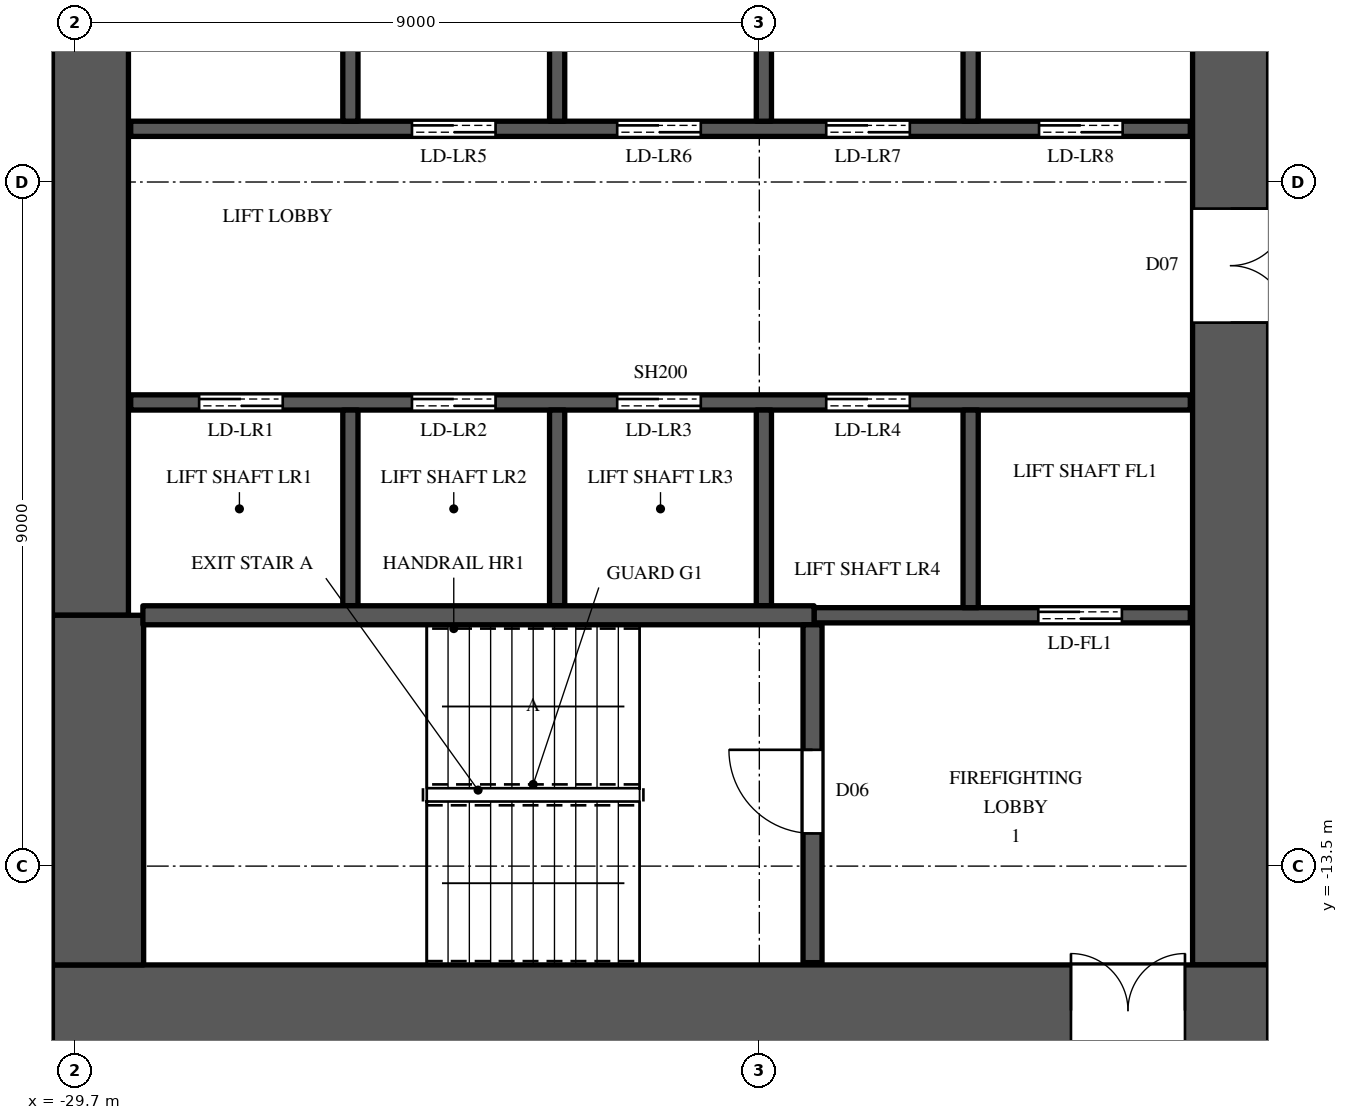
"""IFC4 building model, lengths in metres.
Left out: names, types, materials, properties, quantities, classifications, styles, units other than length and angle.
Written with IfcOpenShell. Run it as: python <this file> out.ifc"""

import sys

from ifc_helpers import new_model, si_unit, direction, frame, frame_2d, origin, place, context, subcontext, project, spatial, rectangle, extrude, element, fill, save


model = new_model("IFC4")
c1 = context("Model", 3, precision=1e-05, world=origin(), true_north=direction((0.0, 1.0)))
c2 = subcontext(c1, "Body", "Model", "MODEL_VIEW")
j1 = project(units=[si_unit("LENGTHUNIT", "METRE"), si_unit("PLANEANGLEUNIT", "RADIAN")], contexts=[c1])
p1 = place(None, origin())
s1 = spatial("IfcSite", under=j1, at=p1, CompositionType="ELEMENT")
p2 = place(p1, origin())
s2 = spatial("IfcBuilding", under=s1, at=p2, CompositionType="ELEMENT")
p3 = place(p2, frame((0.0, 0.0, 102.3)))
s3 = spatial("IfcBuildingStorey", under=s2, at=p3, CompositionType="ELEMENT", Elevation=102.3)
p4 = place(p3, frame((-30.0, -15.4, 0.0), z_axis=(0.0, 0.0, 1.0), x_axis=(1.0, 0.0, 0.0)))
e1 = element("IfcWall", 1, at=p4, inside=s3, PredefinedType="SHEAR", context=c2, shape_type="SweptSolid", body=[
    extrude(rectangle(XDim=16.0, YDim=1.2, at=frame_2d((8.0, 0.0))), origin(), (0.0, 0.0, 1.0), 3.6),
])
p5 = place(p4, frame((13.4, 0.0, 0.0)))
e2 = element("IfcOpeningElement", 2, at=p5, cuts=e1, PredefinedType="OPENING", context=c2, shape_type="SweptSolid", body=[
    extrude(rectangle(XDim=1.5, YDim=2.4, at=frame_2d((0.75, 1.2))), frame((0.0, 0.61, 0.0), z_axis=(0.0, -1.0, 0.0), x_axis=(1.0, 0.0, 0.0)), (0.0, 0.0, 1.0), 1.22),
])
p6 = place(p3, frame((-14.5, -14.8, 0.0), z_axis=(0.0, 0.0, 1.0), x_axis=(0.0, 1.0, 0.0)))
e3 = element("IfcWall", 3, at=p6, inside=s3, PredefinedType="SHEAR", context=c2, shape_type="SweptSolid", body=[
    extrude(rectangle(XDim=29.6, YDim=1.0, at=frame_2d((14.8, 0.0))), origin(), (0.0, 0.0, 1.0), 3.6),
])
p7 = place(p6, frame((8.45, 0.0, 0.0)))
e4 = element("IfcOpeningElement", 4, at=p7, cuts=e3, PredefinedType="OPENING", context=c2, shape_type="SweptSolid", body=[
    extrude(rectangle(XDim=1.5, YDim=2.4, at=frame_2d((0.75, 1.2))), frame((0.0, 0.51, 0.0), z_axis=(0.0, -1.0, 0.0), x_axis=(1.0, 0.0, 0.0)), (0.0, 0.0, 1.0), 1.02),
])
p8 = place(p6, frame((19.65, 0.0, 0.0)))
e5 = element("IfcOpeningElement", 5, at=p8, cuts=e3, PredefinedType="OPENING", context=c2, shape_type="SweptSolid", body=[
    extrude(rectangle(XDim=1.5, YDim=2.4, at=frame_2d((0.75, 1.2))), frame((0.0, 0.51, 0.0), z_axis=(0.0, -1.0, 0.0), x_axis=(1.0, 0.0, 0.0)), (0.0, 0.0, 1.0), 1.02),
])
p9 = place(p6, frame((14.5, 0.0, 0.0)))
e6 = element("IfcOpeningElement", 6, at=p9, cuts=e3, PredefinedType="OPENING", context=c2, shape_type="SweptSolid", body=[
    extrude(rectangle(XDim=0.6, YDim=2.0, at=frame_2d((0.3, 1.0))), frame((0.0, 0.51, 0.0), z_axis=(0.0, -1.0, 0.0), x_axis=(1.0, 0.0, 0.0)), (0.0, 0.0, 1.0), 1.02),
])
p10 = place(p3, frame((-29.5, -10.2, 0.0), z_axis=(0.0, 0.0, 1.0), x_axis=(0.0, 1.0, 0.0)))
e7 = element("IfcWall", 7, at=p10, inside=s3, PredefinedType="SHEAR", context=c2, shape_type="SweptSolid", body=[
    extrude(rectangle(XDim=20.4, YDim=1.0, at=frame_2d((10.2, 0.0))), origin(), (0.0, 0.0, 1.0), 3.6),
])
p11 = place(p3, frame((-29.4, -14.8, 0.0), z_axis=(0.0, 0.0, 1.0), x_axis=(0.0, 1.0, 0.0)))
e8 = element("IfcWall", 8, at=p11, inside=s3, PredefinedType="SHEAR", context=c2, shape_type="SweptSolid", body=[
    extrude(rectangle(XDim=4.6, YDim=1.2, at=frame_2d((2.3, 0.0))), origin(), (0.0, 0.0, 1.0), 3.6),
])
p12 = place(p3, frame((-28.97, -7.4, 0.0), z_axis=(0.0, 0.0, 1.0), x_axis=(1.0, 0.0, 0.0)))
e9 = element("IfcWall", 9, at=p12, inside=s3, PredefinedType="SHEAR", context=c2, shape_type="SweptSolid", body=[
    extrude(rectangle(XDim=13.94, YDim=0.2, at=frame_2d((6.97, 0.0))), origin(), (0.0, 0.0, 1.0), 3.3),
])
p13 = place(p12, frame((0.9, 0.0, 0.0)))
e10 = element("IfcOpeningElement", 10, at=p13, cuts=e9, PredefinedType="OPENING", context=c2, shape_type="SweptSolid", body=[
    extrude(rectangle(XDim=1.1, YDim=2.2, at=frame_2d((0.55, 1.1))), frame((0.0, 0.11, 0.0), z_axis=(0.0, -1.0, 0.0), x_axis=(1.0, 0.0, 0.0)), (0.0, 0.0, 1.0), 0.22),
])
p14 = place(p12, frame((3.7, 0.0, 0.0)))
e11 = element("IfcOpeningElement", 11, at=p14, cuts=e9, PredefinedType="OPENING", context=c2, shape_type="SweptSolid", body=[
    extrude(rectangle(XDim=1.1, YDim=2.2, at=frame_2d((0.55, 1.1))), frame((0.0, 0.11, 0.0), z_axis=(0.0, -1.0, 0.0), x_axis=(1.0, 0.0, 0.0)), (0.0, 0.0, 1.0), 0.22),
])
p15 = place(p12, frame((6.4, 0.0, 0.0)))
e12 = element("IfcOpeningElement", 12, at=p15, cuts=e9, PredefinedType="OPENING", context=c2, shape_type="SweptSolid", body=[
    extrude(rectangle(XDim=1.1, YDim=2.2, at=frame_2d((0.55, 1.1))), frame((0.0, 0.11, 0.0), z_axis=(0.0, -1.0, 0.0), x_axis=(1.0, 0.0, 0.0)), (0.0, 0.0, 1.0), 0.22),
])
p16 = place(p12, frame((9.15, 0.0, 0.0)))
e13 = element("IfcOpeningElement", 13, at=p16, cuts=e9, PredefinedType="OPENING", context=c2, shape_type="SweptSolid", body=[
    extrude(rectangle(XDim=1.1, YDim=2.2, at=frame_2d((0.55, 1.1))), frame((0.0, 0.11, 0.0), z_axis=(0.0, -1.0, 0.0), x_axis=(1.0, 0.0, 0.0)), (0.0, 0.0, 1.0), 0.22),
])
p17 = place(p3, frame((-28.97, -3.8, 0.0), z_axis=(0.0, 0.0, 1.0), x_axis=(1.0, 0.0, 0.0)))
e14 = element("IfcWall", 14, at=p17, inside=s3, PredefinedType="SHEAR", context=c2, shape_type="SweptSolid", body=[
    extrude(rectangle(XDim=13.94, YDim=0.2, at=frame_2d((6.97, 0.0))), origin(), (0.0, 0.0, 1.0), 3.3),
])
p18 = place(p17, frame((3.7, 0.0, 0.0)))
e15 = element("IfcOpeningElement", 15, at=p18, cuts=e14, PredefinedType="OPENING", context=c2, shape_type="SweptSolid", body=[
    extrude(rectangle(XDim=1.1, YDim=2.2, at=frame_2d((0.55, 1.1))), frame((0.0, 0.11, 0.0), z_axis=(0.0, -1.0, 0.0), x_axis=(1.0, 0.0, 0.0)), (0.0, 0.0, 1.0), 0.22),
])
p19 = place(p17, frame((6.4, 0.0, 0.0)))
e16 = element("IfcOpeningElement", 16, at=p19, cuts=e14, PredefinedType="OPENING", context=c2, shape_type="SweptSolid", body=[
    extrude(rectangle(XDim=1.1, YDim=2.2, at=frame_2d((0.55, 1.1))), frame((0.0, 0.11, 0.0), z_axis=(0.0, -1.0, 0.0), x_axis=(1.0, 0.0, 0.0)), (0.0, 0.0, 1.0), 0.22),
])
p20 = place(p17, frame((9.15, 0.0, 0.0)))
e17 = element("IfcOpeningElement", 17, at=p20, cuts=e14, PredefinedType="OPENING", context=c2, shape_type="SweptSolid", body=[
    extrude(rectangle(XDim=1.1, YDim=2.2, at=frame_2d((0.55, 1.1))), frame((0.0, 0.11, 0.0), z_axis=(0.0, -1.0, 0.0), x_axis=(1.0, 0.0, 0.0)), (0.0, 0.0, 1.0), 0.22),
])
p21 = place(p17, frame((11.95, 0.0, 0.0)))
e18 = element("IfcOpeningElement", 18, at=p21, cuts=e14, PredefinedType="OPENING", context=c2, shape_type="SweptSolid", body=[
    extrude(rectangle(XDim=1.1, YDim=2.2, at=frame_2d((0.55, 1.1))), frame((0.0, 0.11, 0.0), z_axis=(0.0, -1.0, 0.0), x_axis=(1.0, 0.0, 0.0)), (0.0, 0.0, 1.0), 0.22),
])
p22 = place(p3, frame((-26.08, -10.075, 0.0), z_axis=(0.0, 0.0, 1.0), x_axis=(0.0, 1.0, 0.0)))
e19 = element("IfcWall", 19, at=p22, inside=s3, PredefinedType="SHEAR", context=c2, shape_type="SweptSolid", body=[
    extrude(rectangle(XDim=2.575, YDim=0.2, at=frame_2d((1.288, 0.0))), origin(), (0.0, 0.0, 1.0), 3.6),
])
p23 = place(p3, frame((-26.08, -3.7, 0.0), z_axis=(0.0, 0.0, 1.0), x_axis=(0.0, 1.0, 0.0)))
e20 = element("IfcWall", 20, at=p23, inside=s3, PredefinedType="SHEAR", context=c2, shape_type="SweptSolid", body=[
    extrude(rectangle(XDim=2.6, YDim=0.2, at=frame_2d((1.3, 0.0))), origin(), (0.0, 0.0, 1.0), 3.6),
])
p24 = place(p3, frame((-23.36, -10.075, 0.0), z_axis=(0.0, 0.0, 1.0), x_axis=(0.0, 1.0, 0.0)))
e21 = element("IfcWall", 21, at=p24, inside=s3, PredefinedType="SHEAR", context=c2, shape_type="SweptSolid", body=[
    extrude(rectangle(XDim=2.575, YDim=0.2, at=frame_2d((1.288, 0.0))), origin(), (0.0, 0.0, 1.0), 3.6),
])
p25 = place(p3, frame((-23.36, -3.7, 0.0), z_axis=(0.0, 0.0, 1.0), x_axis=(0.0, 1.0, 0.0)))
e22 = element("IfcWall", 22, at=p25, inside=s3, PredefinedType="SHEAR", context=c2, shape_type="SweptSolid", body=[
    extrude(rectangle(XDim=2.6, YDim=0.2, at=frame_2d((1.3, 0.0))), origin(), (0.0, 0.0, 1.0), 3.6),
])
p26 = place(p3, frame((-20.64, -10.075, 0.0), z_axis=(0.0, 0.0, 1.0), x_axis=(0.0, 1.0, 0.0)))
e23 = element("IfcWall", 23, at=p26, inside=s3, PredefinedType="SHEAR", context=c2, shape_type="SweptSolid", body=[
    extrude(rectangle(XDim=2.575, YDim=0.2, at=frame_2d((1.288, 0.0))), origin(), (0.0, 0.0, 1.0), 3.6),
])
p27 = place(p3, frame((-20.64, -3.7, 0.0), z_axis=(0.0, 0.0, 1.0), x_axis=(0.0, 1.0, 0.0)))
e24 = element("IfcWall", 24, at=p27, inside=s3, PredefinedType="SHEAR", context=c2, shape_type="SweptSolid", body=[
    extrude(rectangle(XDim=2.6, YDim=0.2, at=frame_2d((1.3, 0.0))), origin(), (0.0, 0.0, 1.0), 3.6),
])
p28 = place(p3, frame((-19.98, -10.2, 0.0), z_axis=(0.0, 0.0, 1.0), x_axis=(1.0, 0.0, 0.0)))
e25 = element("IfcWall", 25, at=p28, inside=s3, PredefinedType="SHEAR", context=c2, shape_type="SweptSolid", body=[
    extrude(rectangle(XDim=4.95, YDim=0.2, at=frame_2d((2.475, 0.0))), origin(), (0.0, 0.0, 1.0), 3.3),
])
p29 = place(p28, frame((2.95, 0.0, 0.0)))
e26 = element("IfcOpeningElement", 26, at=p29, cuts=e25, PredefinedType="OPENING", context=c2, shape_type="SweptSolid", body=[
    extrude(rectangle(XDim=1.1, YDim=2.2, at=frame_2d((0.55, 1.1))), frame((0.0, 0.11, 0.0), z_axis=(0.0, -1.0, 0.0), x_axis=(1.0, 0.0, 0.0)), (0.0, 0.0, 1.0), 0.22),
])
p30 = place(p3, frame((-17.92, -10.1, 0.0), z_axis=(0.0, 0.0, 1.0), x_axis=(0.0, 1.0, 0.0)))
e27 = element("IfcWall", 27, at=p30, inside=s3, PredefinedType="SHEAR", context=c2, shape_type="SweptSolid", body=[
    extrude(rectangle(XDim=2.6, YDim=0.2, at=frame_2d((1.3, 0.0))), origin(), (0.0, 0.0, 1.0), 3.6),
])
p31 = place(p3, frame((-17.92, -3.7, 0.0), z_axis=(0.0, 0.0, 1.0), x_axis=(0.0, 1.0, 0.0)))
e28 = element("IfcWall", 28, at=p31, inside=s3, PredefinedType="SHEAR", context=c2, shape_type="SweptSolid", body=[
    extrude(rectangle(XDim=2.6, YDim=0.2, at=frame_2d((1.3, 0.0))), origin(), (0.0, 0.0, 1.0), 3.6),
])
p32 = place(p3, frame((-28.81, -10.2, 0.0), z_axis=(0.0, 0.0, 1.0), x_axis=(1.0, 0.0, 0.0)))
e29 = element("IfcWall", 29, at=p32, inside=s3, PredefinedType="SHEAR", context=c2, shape_type="SweptSolid", body=[
    extrude(rectangle(XDim=8.83, YDim=0.25, at=frame_2d((4.415, 0.0))), origin(), (0.0, 0.0, 1.0), 3.3),
])
p33 = place(p3, frame((-20.0, -14.77, 0.0), z_axis=(0.0, 0.0, 1.0), x_axis=(0.0, 1.0, 0.0)))
e30 = element("IfcWall", 30, at=p33, inside=s3, PredefinedType="SHEAR", context=c2, shape_type="SweptSolid", body=[
    extrude(rectangle(XDim=4.445, YDim=0.25, at=frame_2d((2.223, 0.0))), origin(), (0.0, 0.0, 1.0), 3.3),
])
p34 = place(p33, frame((1.7, 0.0, 0.0)))
e31 = element("IfcOpeningElement", 31, at=p34, cuts=e30, PredefinedType="OPENING", context=c2, shape_type="SweptSolid", body=[
    extrude(rectangle(XDim=1.1, YDim=2.2, at=frame_2d((0.55, 1.1))), frame((0.0, 0.135, 0.0), z_axis=(0.0, -1.0, 0.0), x_axis=(1.0, 0.0, 0.0)), (0.0, 0.0, 1.0), 0.27),
])
p35 = place(p34, origin())
e32 = element("IfcDoor", 32, at=p35, inside=s3, OperationType="SINGLE_SWING_RIGHT", PredefinedType="DOOR", context=c2, shape_type="SweptSolid", body=[
    extrude(rectangle(XDim=1.1, YDim=2.2, at=frame_2d((0.55, 1.1))), frame((0.0, 0.025, 0.0), z_axis=(0.0, -1.0, 0.0), x_axis=(1.0, 0.0, 0.0)), (0.0, 0.0, 1.0), 0.05),
])
fill(e31, e32)
p36 = place(p13, origin())
e33 = element("IfcDoor", 33, at=p36, inside=s3, OperationType="DOUBLE_DOOR_SLIDING", PredefinedType="DOOR", context=c2, shape_type="SweptSolid", body=[
    extrude(rectangle(XDim=1.1, YDim=2.2, at=frame_2d((0.55, 1.1))), frame((0.0, 0.025, 0.0), z_axis=(0.0, -1.0, 0.0), x_axis=(1.0, 0.0, 0.0)), (0.0, 0.0, 1.0), 0.05),
])
fill(e10, e33)
p37 = place(p14, origin())
e34 = element("IfcDoor", 34, at=p37, inside=s3, OperationType="DOUBLE_DOOR_SLIDING", PredefinedType="DOOR", context=c2, shape_type="SweptSolid", body=[
    extrude(rectangle(XDim=1.1, YDim=2.2, at=frame_2d((0.55, 1.1))), frame((0.0, 0.025, 0.0), z_axis=(0.0, -1.0, 0.0), x_axis=(1.0, 0.0, 0.0)), (0.0, 0.0, 1.0), 0.05),
])
fill(e11, e34)
p38 = place(p15, origin())
e35 = element("IfcDoor", 35, at=p38, inside=s3, OperationType="DOUBLE_DOOR_SLIDING", PredefinedType="DOOR", context=c2, shape_type="SweptSolid", body=[
    extrude(rectangle(XDim=1.1, YDim=2.2, at=frame_2d((0.55, 1.1))), frame((0.0, 0.025, 0.0), z_axis=(0.0, -1.0, 0.0), x_axis=(1.0, 0.0, 0.0)), (0.0, 0.0, 1.0), 0.05),
])
fill(e12, e35)
p39 = place(p16, origin())
e36 = element("IfcDoor", 36, at=p39, inside=s3, OperationType="DOUBLE_DOOR_SLIDING", PredefinedType="DOOR", context=c2, shape_type="SweptSolid", body=[
    extrude(rectangle(XDim=1.1, YDim=2.2, at=frame_2d((0.55, 1.1))), frame((0.0, 0.025, 0.0), z_axis=(0.0, -1.0, 0.0), x_axis=(1.0, 0.0, 0.0)), (0.0, 0.0, 1.0), 0.05),
])
fill(e13, e36)
p40 = place(p29, origin())
e37 = element("IfcDoor", 37, at=p40, inside=s3, OperationType="DOUBLE_DOOR_SLIDING", PredefinedType="DOOR", context=c2, shape_type="SweptSolid", body=[
    extrude(rectangle(XDim=1.1, YDim=2.2, at=frame_2d((0.55, 1.1))), frame((0.0, 0.025, 0.0), z_axis=(0.0, -1.0, 0.0), x_axis=(1.0, 0.0, 0.0)), (0.0, 0.0, 1.0), 0.05),
])
fill(e26, e37)
p41 = place(p18, origin())
e38 = element("IfcDoor", 38, at=p41, inside=s3, OperationType="DOUBLE_DOOR_SLIDING", PredefinedType="DOOR", context=c2, shape_type="SweptSolid", body=[
    extrude(rectangle(XDim=1.1, YDim=2.2, at=frame_2d((0.55, 1.1))), frame((0.0, 0.025, 0.0), z_axis=(0.0, -1.0, 0.0), x_axis=(1.0, 0.0, 0.0)), (0.0, 0.0, 1.0), 0.05),
])
fill(e15, e38)
p42 = place(p19, origin())
e39 = element("IfcDoor", 39, at=p42, inside=s3, OperationType="DOUBLE_DOOR_SLIDING", PredefinedType="DOOR", context=c2, shape_type="SweptSolid", body=[
    extrude(rectangle(XDim=1.1, YDim=2.2, at=frame_2d((0.55, 1.1))), frame((0.0, 0.025, 0.0), z_axis=(0.0, -1.0, 0.0), x_axis=(1.0, 0.0, 0.0)), (0.0, 0.0, 1.0), 0.05),
])
fill(e16, e39)
p43 = place(p20, origin())
e40 = element("IfcDoor", 40, at=p43, inside=s3, OperationType="DOUBLE_DOOR_SLIDING", PredefinedType="DOOR", context=c2, shape_type="SweptSolid", body=[
    extrude(rectangle(XDim=1.1, YDim=2.2, at=frame_2d((0.55, 1.1))), frame((0.0, 0.025, 0.0), z_axis=(0.0, -1.0, 0.0), x_axis=(1.0, 0.0, 0.0)), (0.0, 0.0, 1.0), 0.05),
])
fill(e17, e40)
p44 = place(p21, origin())
e41 = element("IfcDoor", 41, at=p44, inside=s3, OperationType="DOUBLE_DOOR_SLIDING", PredefinedType="DOOR", context=c2, shape_type="SweptSolid", body=[
    extrude(rectangle(XDim=1.1, YDim=2.2, at=frame_2d((0.55, 1.1))), frame((0.0, 0.025, 0.0), z_axis=(0.0, -1.0, 0.0), x_axis=(1.0, 0.0, 0.0)), (0.0, 0.0, 1.0), 0.05),
])
fill(e18, e41)
p45 = place(p5, origin())
e42 = element("IfcDoor", 42, at=p45, inside=s3, OperationType="DOUBLE_DOOR_SINGLE_SWING", PredefinedType="DOOR", context=c2, shape_type="SweptSolid", body=[
    extrude(rectangle(XDim=1.5, YDim=2.4, at=frame_2d((0.75, 1.2))), frame((0.0, 0.025, 0.0), z_axis=(0.0, -1.0, 0.0), x_axis=(1.0, 0.0, 0.0)), (0.0, 0.0, 1.0), 0.05),
])
fill(e2, e42)
p46 = place(p7, origin())
e43 = element("IfcDoor", 43, at=p46, inside=s3, OperationType="DOUBLE_DOOR_SINGLE_SWING", PredefinedType="DOOR", context=c2, shape_type="SweptSolid", body=[
    extrude(rectangle(XDim=1.5, YDim=2.4, at=frame_2d((0.75, 1.2))), frame((0.0, -0.445, 0.0), z_axis=(0.0, -1.0, 0.0), x_axis=(1.0, 0.0, 0.0)), (0.0, 0.0, 1.0), 0.05),
])
fill(e4, e43)
save(model, sys.argv[1])
